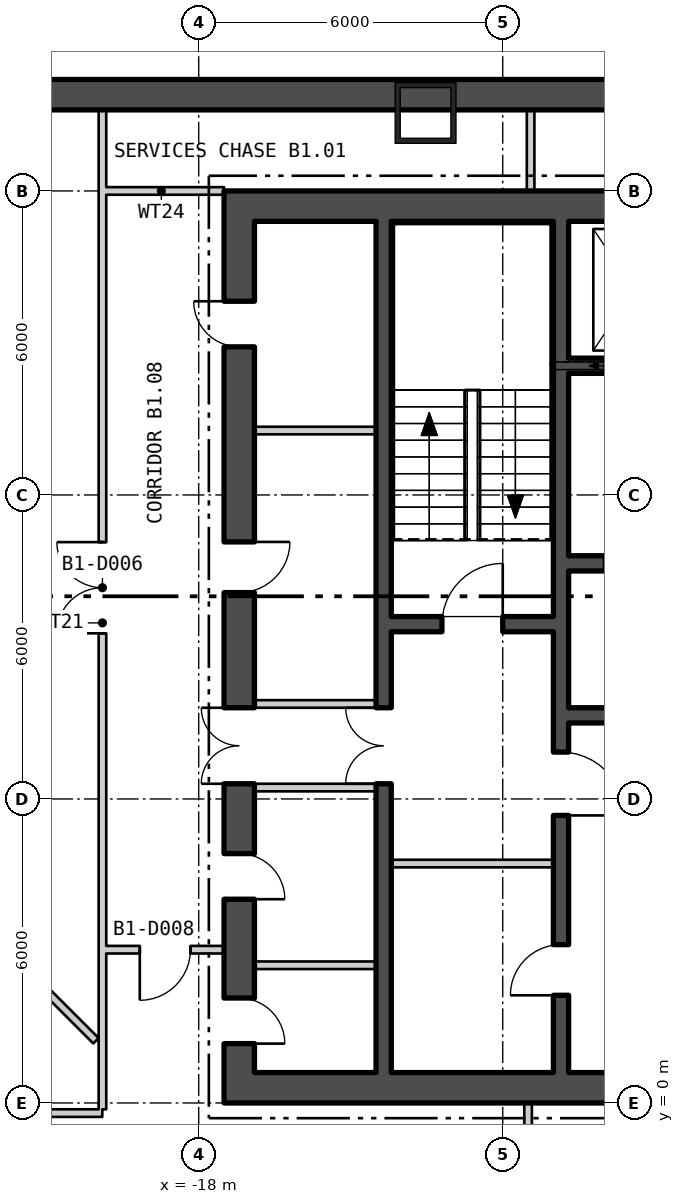
"""IFC4 building model, lengths in metres.
Left out: names, types, materials, properties, quantities, classifications, styles, units other than length and angle.
Written with IfcOpenShell. Run it as: python <this file> out.ifc"""

import sys

from ifc_helpers import new_model, si_unit, direction, frame, frame_2d, origin, origin_2d, place, context, subcontext, project, spatial, rectangle, hollow_rectangle, extrude, element, fill, save


model = new_model("IFC4")
c1 = context("Model", 3, precision=1e-05, world=origin(), true_north=direction((0.0, 1.0)))
c2 = subcontext(c1, "Body", "Model", "MODEL_VIEW")
j1 = project(units=[si_unit("LENGTHUNIT", "METRE"), si_unit("PLANEANGLEUNIT", "RADIAN")], contexts=[c1])
p1 = place(None, origin())
s1 = spatial("IfcSite", under=j1, at=p1, CompositionType="ELEMENT")
p2 = place(p1, origin())
s2 = spatial("IfcBuilding", under=s1, at=p2, CompositionType="ELEMENT")
p3 = place(p2, frame((0.0, 0.0, -5.7)))
s3 = spatial("IfcBuildingStorey", under=s2, at=p3, CompositionType="ELEMENT", Elevation=-5.7)
p4 = place(p3, frame((-13.523, 19.54, 0.0), z_axis=(0.0, 0.0, 1.0), x_axis=(-1.0, 0.0, 0.0)))
e1 = element("IfcColumn", 1, at=p4, inside=s3, PredefinedType="COLUMN", context=c2, shape_type="SweptSolid", body=[
    extrude(hollow_rectangle(XDim=1.2, YDim=1.2, WallThickness=0.1, at=origin_2d()), origin(), (0.0, 0.0, 1.0), 5.7),
])
p5 = place(p3, frame((-39.0, 19.9, -0.4), z_axis=(0.0, 0.0, 1.0), x_axis=(1.0, 0.0, 0.0)))
e2 = element("IfcWall", 2, at=p5, inside=s3, PredefinedType="STANDARD", context=c2, shape_type="SweptSolid", body=[
    extrude(rectangle(XDim=78.0, YDim=0.6, at=frame_2d((39.0, 0.0))), origin(), (0.0, 0.0, 1.0), 5.7),
])
p6 = place(p3, frame((-17.5, 0.3, 0.0), z_axis=(0.0, 0.0, 1.0), x_axis=(1.0, 0.0, 0.0)))
e3 = element("IfcWall", 3, at=p6, inside=s3, PredefinedType="SHEAR", context=c2, shape_type="SweptSolid", body=[
    extrude(rectangle(XDim=35.0, YDim=0.6, at=frame_2d((17.5, 0.0))), origin(), (0.0, 0.0, 1.0), 5.25),
])
p7 = place(p6, frame((12.0, 0.0, 0.0)))
e4 = element("IfcOpeningElement", 4, at=p7, cuts=e3, PredefinedType="OPENING", context=c2, shape_type="SweptSolid", body=[
    extrude(rectangle(XDim=1.8, YDim=2.4, at=frame_2d((0.9, 1.2))), frame((0.0, 0.31, 0.0), z_axis=(0.0, -1.0, 0.0), x_axis=(1.0, 0.0, 0.0)), (0.0, 0.0, 1.0), 0.62),
])
p8 = place(p6, frame((22.0, 0.0, 0.0)))
e5 = element("IfcOpeningElement", 5, at=p8, cuts=e3, PredefinedType="OPENING", context=c2, shape_type="SweptSolid", body=[
    extrude(rectangle(XDim=1.8, YDim=2.4, at=frame_2d((0.9, 1.2))), frame((0.0, 0.31, 0.0), z_axis=(0.0, -1.0, 0.0), x_axis=(1.0, 0.0, 0.0)), (0.0, 0.0, 1.0), 0.62),
])
p9 = place(p3, frame((-17.5, 17.7, 0.0), z_axis=(0.0, 0.0, 1.0), x_axis=(1.0, 0.0, 0.0)))
e6 = element("IfcWall", 6, at=p9, inside=s3, PredefinedType="SHEAR", context=c2, shape_type="SweptSolid", body=[
    extrude(rectangle(XDim=35.0, YDim=0.6, at=frame_2d((17.5, 0.0))), origin(), (0.0, 0.0, 1.0), 5.25),
])
p10 = place(p3, frame((-17.2, 0.6, 0.0), z_axis=(0.0, 0.0, 1.0), x_axis=(0.0, 1.0, 0.0)))
e7 = element("IfcWall", 7, at=p10, inside=s3, PredefinedType="SHEAR", context=c2, shape_type="SweptSolid", body=[
    extrude(rectangle(XDim=16.8, YDim=0.6, at=frame_2d((8.4, 0.0))), origin(), (0.0, 0.0, 1.0), 5.25),
])
p11 = place(p10, frame((5.7, 0.0, 0.0)))
e8 = element("IfcOpeningElement", 8, at=p11, cuts=e7, PredefinedType="OPENING", context=c2, shape_type="SweptSolid", body=[
    extrude(rectangle(XDim=1.5, YDim=2.1, at=frame_2d((0.75, 1.05))), frame((0.0, 0.31, 0.0), z_axis=(0.0, -1.0, 0.0), x_axis=(1.0, 0.0, 0.0)), (0.0, 0.0, 1.0), 0.62),
])
p12 = place(p10, frame((0.571, 0.0, 0.0)))
e9 = element("IfcOpeningElement", 9, at=p12, cuts=e7, PredefinedType="OPENING", context=c2, shape_type="SweptSolid", body=[
    extrude(rectangle(XDim=0.9, YDim=2.1, at=frame_2d((0.45, 1.05))), frame((0.0, 0.31, 0.0), z_axis=(0.0, -1.0, 0.0), x_axis=(1.0, 0.0, 0.0)), (0.0, 0.0, 1.0), 0.62),
])
p13 = place(p10, frame((3.421, 0.0, 0.0)))
e10 = element("IfcOpeningElement", 10, at=p13, cuts=e7, PredefinedType="OPENING", context=c2, shape_type="SweptSolid", body=[
    extrude(rectangle(XDim=0.9, YDim=2.1, at=frame_2d((0.45, 1.05))), frame((0.0, 0.31, 0.0), z_axis=(0.0, -1.0, 0.0), x_axis=(1.0, 0.0, 0.0)), (0.0, 0.0, 1.0), 0.62),
])
p14 = place(p10, frame((9.473, 0.0, 0.0)))
e11 = element("IfcOpeningElement", 11, at=p14, cuts=e7, PredefinedType="OPENING", context=c2, shape_type="SweptSolid", body=[
    extrude(rectangle(XDim=1.0, YDim=2.1, at=frame_2d((0.5, 1.05))), frame((0.0, 0.31, 0.0), z_axis=(0.0, -1.0, 0.0), x_axis=(1.0, 0.0, 0.0)), (0.0, 0.0, 1.0), 0.62),
])
p15 = place(p10, frame((14.323, 0.0, 0.0)))
e12 = element("IfcOpeningElement", 12, at=p15, cuts=e7, PredefinedType="OPENING", context=c2, shape_type="SweptSolid", body=[
    extrude(rectangle(XDim=0.9, YDim=2.1, at=frame_2d((0.45, 1.05))), frame((0.0, 0.31, 0.0), z_axis=(0.0, -1.0, 0.0), x_axis=(1.0, 0.0, 0.0)), (0.0, 0.0, 1.0), 0.62),
])
p16 = place(p3, frame((-10.85, 0.6, 0.0), z_axis=(0.0, 0.0, 1.0), x_axis=(0.0, 1.0, 0.0)))
e13 = element("IfcWall", 13, at=p16, inside=s3, PredefinedType="SHEAR", context=c2, shape_type="SweptSolid", body=[
    extrude(rectangle(XDim=16.8, YDim=0.3, at=frame_2d((8.4, 0.0))), origin(), (0.0, 0.0, 1.0), 5.25),
])
p17 = place(p16, frame((5.075, 0.0, 0.0)))
e14 = element("IfcOpeningElement", 14, at=p17, cuts=e13, PredefinedType="OPENING", context=c2, shape_type="SweptSolid", body=[
    extrude(rectangle(XDim=1.25, YDim=2.1, at=frame_2d((0.625, 1.05))), frame((0.0, 0.16, 0.0), z_axis=(0.0, -1.0, 0.0), x_axis=(1.0, 0.0, 0.0)), (0.0, 0.0, 1.0), 0.32),
])
p18 = place(p16, frame((1.525, 0.0, 0.0)))
e15 = element("IfcOpeningElement", 15, at=p18, cuts=e13, PredefinedType="OPENING", context=c2, shape_type="SweptSolid", body=[
    extrude(rectangle(XDim=1.0, YDim=2.1, at=frame_2d((0.5, 1.05))), frame((0.0, 0.16, 0.0), z_axis=(0.0, -1.0, 0.0), x_axis=(1.0, 0.0, 0.0)), (0.0, 0.0, 1.0), 0.32),
])
p19 = place(p3, frame((-14.35, 0.6, 0.0), z_axis=(0.0, 0.0, 1.0), x_axis=(0.0, 1.0, 0.0)))
e16 = element("IfcWall", 16, at=p19, inside=s3, PredefinedType="SHEAR", context=c2, shape_type="SweptSolid", body=[
    extrude(rectangle(XDim=16.8, YDim=0.3, at=frame_2d((8.4, 0.0))), origin(), (0.0, 0.0, 1.0), 5.25),
])
p20 = place(p19, frame((5.7, 0.0, 0.0)))
e17 = element("IfcOpeningElement", 17, at=p20, cuts=e16, PredefinedType="OPENING", context=c2, shape_type="SweptSolid", body=[
    extrude(rectangle(XDim=1.5, YDim=2.1, at=frame_2d((0.75, 1.05))), frame((0.0, 0.16, 0.0), z_axis=(0.0, -1.0, 0.0), x_axis=(1.0, 0.0, 0.0)), (0.0, 0.0, 1.0), 0.32),
])
p21 = place(p3, frame((-14.2, 9.45, 0.0), z_axis=(0.0, 0.0, 1.0), x_axis=(1.0, 0.0, 0.0)))
e18 = element("IfcWall", 18, at=p21, inside=s3, PredefinedType="SHEAR", context=c2, shape_type="SweptSolid", body=[
    extrude(rectangle(XDim=3.2, YDim=0.3, at=frame_2d((1.6, 0.0))), origin(), (0.0, 0.0, 1.0), 5.25),
])
p22 = place(p21, frame((1.0, 0.0, 0.0)))
e19 = element("IfcOpeningElement", 19, at=p22, cuts=e18, PredefinedType="OPENING", context=c2, shape_type="SweptSolid", body=[
    extrude(rectangle(XDim=1.2, YDim=2.1, at=frame_2d((0.6, 1.05))), frame((0.0, 0.16, 0.0), z_axis=(0.0, -1.0, 0.0), x_axis=(1.0, 0.0, 0.0)), (0.0, 0.0, 1.0), 0.32),
])
p23 = place(p3, frame((-10.7, 14.55, 0.0), z_axis=(0.0, 0.0, 1.0), x_axis=(1.0, 0.0, 0.0)))
e20 = element("IfcWall", 20, at=p23, inside=s3, PredefinedType="SHEAR", context=c2, shape_type="SweptSolid", body=[
    extrude(rectangle(XDim=21.4, YDim=0.3, at=frame_2d((10.7, 0.0))), origin(), (0.0, 0.0, 1.0), 5.25),
])
p24 = place(p23, frame((0.738, 0.0, 0.0)))
e21 = element("IfcOpeningElement", 21, at=p24, cuts=e20, PredefinedType="OPENING", context=c2, shape_type="SweptSolid", body=[
    extrude(rectangle(XDim=1.1, YDim=2.1, at=frame_2d((0.55, 1.05))), frame((0.0, 0.16, 0.0), z_axis=(0.0, -1.0, 0.0), x_axis=(1.0, 0.0, 0.0)), (0.0, 0.0, 1.0), 0.32),
])
p25 = place(p23, frame((3.462, 0.0, 0.0)))
e22 = element("IfcOpeningElement", 22, at=p25, cuts=e20, PredefinedType="OPENING", context=c2, shape_type="SweptSolid", body=[
    extrude(rectangle(XDim=1.1, YDim=2.1, at=frame_2d((0.55, 1.05))), frame((0.0, 0.16, 0.0), z_axis=(0.0, -1.0, 0.0), x_axis=(1.0, 0.0, 0.0)), (0.0, 0.0, 1.0), 0.32),
])
p26 = place(p23, frame((6.138, 0.0, 0.0)))
e23 = element("IfcOpeningElement", 23, at=p26, cuts=e20, PredefinedType="OPENING", context=c2, shape_type="SweptSolid", body=[
    extrude(rectangle(XDim=1.1, YDim=2.1, at=frame_2d((0.55, 1.05))), frame((0.0, 0.16, 0.0), z_axis=(0.0, -1.0, 0.0), x_axis=(1.0, 0.0, 0.0)), (0.0, 0.0, 1.0), 0.32),
])
p27 = place(p23, frame((14.162, 0.0, 0.0)))
e24 = element("IfcOpeningElement", 24, at=p27, cuts=e20, PredefinedType="OPENING", context=c2, shape_type="SweptSolid", body=[
    extrude(rectangle(XDim=1.1, YDim=2.1, at=frame_2d((0.55, 1.05))), frame((0.0, 0.16, 0.0), z_axis=(0.0, -1.0, 0.0), x_axis=(1.0, 0.0, 0.0)), (0.0, 0.0, 1.0), 0.32),
])
p28 = place(p23, frame((16.837, 0.0, 0.0)))
e25 = element("IfcOpeningElement", 25, at=p28, cuts=e20, PredefinedType="OPENING", context=c2, shape_type="SweptSolid", body=[
    extrude(rectangle(XDim=1.1, YDim=2.1, at=frame_2d((0.55, 1.05))), frame((0.0, 0.16, 0.0), z_axis=(0.0, -1.0, 0.0), x_axis=(1.0, 0.0, 0.0)), (0.0, 0.0, 1.0), 0.32),
])
p29 = place(p23, frame((19.562, 0.0, 0.0)))
e26 = element("IfcOpeningElement", 26, at=p29, cuts=e20, PredefinedType="OPENING", context=c2, shape_type="SweptSolid", body=[
    extrude(rectangle(XDim=1.1, YDim=2.1, at=frame_2d((0.55, 1.05))), frame((0.0, 0.16, 0.0), z_axis=(0.0, -1.0, 0.0), x_axis=(1.0, 0.0, 0.0)), (0.0, 0.0, 1.0), 0.32),
])
p30 = place(p23, frame((8.863, 0.0, 0.0)))
e27 = element("IfcOpeningElement", 27, at=p30, cuts=e20, PredefinedType="OPENING", context=c2, shape_type="SweptSolid", body=[
    extrude(rectangle(XDim=1.0, YDim=2.1, at=frame_2d((0.5, 1.05))), frame((0.0, 0.16, 0.0), z_axis=(0.0, -1.0, 0.0), x_axis=(1.0, 0.0, 0.0)), (0.0, 0.0, 1.0), 0.32),
])
p31 = place(p23, frame((11.537, 0.0, 0.0)))
e28 = element("IfcOpeningElement", 28, at=p31, cuts=e20, PredefinedType="OPENING", context=c2, shape_type="SweptSolid", body=[
    extrude(rectangle(XDim=1.0, YDim=2.1, at=frame_2d((0.5, 1.05))), frame((0.0, 0.16, 0.0), z_axis=(0.0, -1.0, 0.0), x_axis=(1.0, 0.0, 0.0)), (0.0, 0.0, 1.0), 0.32),
])
p32 = place(p3, frame((-10.7, 10.65, 0.0), z_axis=(0.0, 0.0, 1.0), x_axis=(1.0, 0.0, 0.0)))
e29 = element("IfcWall", 29, at=p32, inside=s3, PredefinedType="SHEAR", context=c2, shape_type="SweptSolid", body=[
    extrude(rectangle(XDim=10.3, YDim=0.3, at=frame_2d((5.15, 0.0))), origin(), (0.0, 0.0, 1.0), 5.25),
])
p33 = place(p32, frame((0.725, 0.0, 0.0)))
e30 = element("IfcOpeningElement", 30, at=p33, cuts=e29, PredefinedType="OPENING", context=c2, shape_type="SweptSolid", body=[
    extrude(rectangle(XDim=1.0, YDim=2.1, at=frame_2d((0.5, 1.05))), frame((0.0, 0.16, 0.0), z_axis=(0.0, -1.0, 0.0), x_axis=(1.0, 0.0, 0.0)), (0.0, 0.0, 1.0), 0.32),
])
p34 = place(p32, frame((3.325, 0.0, 0.0)))
e31 = element("IfcOpeningElement", 31, at=p34, cuts=e29, PredefinedType="OPENING", context=c2, shape_type="SweptSolid", body=[
    extrude(rectangle(XDim=1.0, YDim=2.1, at=frame_2d((0.5, 1.05))), frame((0.0, 0.16, 0.0), z_axis=(0.0, -1.0, 0.0), x_axis=(1.0, 0.0, 0.0)), (0.0, 0.0, 1.0), 0.32),
])
p35 = place(p32, frame((5.875, 0.0, 0.0)))
e32 = element("IfcOpeningElement", 32, at=p35, cuts=e29, PredefinedType="OPENING", context=c2, shape_type="SweptSolid", body=[
    extrude(rectangle(XDim=1.0, YDim=2.1, at=frame_2d((0.5, 1.05))), frame((0.0, 0.16, 0.0), z_axis=(0.0, -1.0, 0.0), x_axis=(1.0, 0.0, 0.0)), (0.0, 0.0, 1.0), 0.32),
])
p36 = place(p32, frame((8.425, 0.0, 0.0)))
e33 = element("IfcOpeningElement", 33, at=p36, cuts=e29, PredefinedType="OPENING", context=c2, shape_type="SweptSolid", body=[
    extrude(rectangle(XDim=1.0, YDim=2.1, at=frame_2d((0.5, 1.05))), frame((0.0, 0.16, 0.0), z_axis=(0.0, -1.0, 0.0), x_axis=(1.0, 0.0, 0.0)), (0.0, 0.0, 1.0), 0.32),
])
p37 = place(p3, frame((-10.7, 7.65, 0.0), z_axis=(0.0, 0.0, 1.0), x_axis=(1.0, 0.0, 0.0)))
e34 = element("IfcWall", 34, at=p37, inside=s3, PredefinedType="SHEAR", context=c2, shape_type="SweptSolid", body=[
    extrude(rectangle(XDim=10.3, YDim=0.3, at=frame_2d((5.15, 0.0))), origin(), (0.0, 0.0, 1.0), 5.25),
])
p38 = place(p3, frame((-14.2, 4.725, 0.0), z_axis=(0.0, 0.0, 1.0), x_axis=(1.0, 0.0, 0.0)))
e35 = element("IfcWall", 35, at=p38, inside=s3, PredefinedType="PARTITIONING", context=c2, shape_type="SweptSolid", body=[
    extrude(rectangle(XDim=3.2, YDim=0.15, at=frame_2d((1.6, 0.0))), origin(), (0.0, 0.0, 1.0), 5.25),
])
for number, where, z_axis, x_axis in (
    (36, (-16.9, 6.225, 0.0), (0.0, 0.0, 1.0), (1.0, 0.0, 0.0)),
    (37, (-16.9, 7.875, 0.0), (0.0, 0.0, 1.0), (1.0, 0.0, 0.0)),
    (38, (-16.9, 2.718, 0.0), (0.0, 0.0, 1.0), (1.0, 0.0, 0.0)),
    (39, (-16.9, 13.271, 0.0), (0.0, 0.0, 1.0), (1.0, 0.0, 0.0)),
):
    element("IfcWall", number, at=place(p3, frame(where, z_axis=z_axis, x_axis=x_axis)), inside=s3, PredefinedType="PARTITIONING", context=c2, shape_type="SweptSolid", body=[
        extrude(rectangle(XDim=2.4, YDim=0.15, at=frame_2d((1.2, 0.0))), origin(), (0.0, 0.0, 1.0), 5.25),
    ])
p39 = place(p3, frame((-26.75, -0.2, 0.0), z_axis=(0.0, 0.0, 1.0), x_axis=(1.0, 0.0, 0.0)))
e40 = element("IfcWall", 40, at=p39, inside=s3, PredefinedType="PARTITIONING", context=c2, shape_type="SweptSolid", body=[
    extrude(rectangle(XDim=6.847, YDim=0.15, at=frame_2d((3.424, 0.0))), origin(), (0.0, 0.0, 1.0), 5.25),
])
p40 = place(p39, frame((3.983, 0.0, 0.0)))
e41 = element("IfcOpeningElement", 41, at=p40, cuts=e40, PredefinedType="OPENING", context=c2, shape_type="SweptSolid", body=[
    extrude(rectangle(XDim=1.0, YDim=2.1, at=frame_2d((0.5, 1.05))), frame((0.0, 0.085, 0.0), z_axis=(0.0, -1.0, 0.0), x_axis=(1.0, 0.0, 0.0)), (0.0, 0.0, 1.0), 0.17),
])
p41 = place(p3, frame((-25.392, 6.592, 0.0), z_axis=(0.0, 0.0, 1.0), x_axis=(0.707106781187, -0.707106781187, 0.0)))
e42 = element("IfcWall", 42, at=p41, inside=s3, PredefinedType="PARTITIONING", context=c2, shape_type="SweptSolid", body=[
    extrude(rectangle(XDim=7.586, YDim=0.15, at=frame_2d((3.793, 0.0))), origin(), (0.0, 0.0, 1.0), 5.25),
])
p42 = place(p3, frame((-19.975, 18.0, 0.0), z_axis=(0.0, 0.0, 1.0), x_axis=(1.0, 0.0, 0.0)))
e43 = element("IfcWall", 43, at=p42, inside=s3, PredefinedType="PARTITIONING", context=c2, shape_type="SweptSolid", body=[
    extrude(rectangle(XDim=2.475, YDim=0.15, at=frame_2d((1.238, 0.0))), origin(), (0.0, 0.0, 1.0), 5.25),
])
p43 = place(p3, frame((-19.9, -0.125, 0.0), z_axis=(0.0, 0.0, 1.0), x_axis=(0.0, 1.0, 0.0)))
e44 = element("IfcWall", 44, at=p43, inside=s3, PredefinedType="PARTITIONING", context=c2, shape_type="SweptSolid", body=[
    extrude(rectangle(XDim=1.15, YDim=0.15, at=frame_2d((0.575, 0.0))), origin(), (0.0, 0.0, 1.0), 5.25),
])
p44 = place(p3, frame((-19.9, 1.025, 0.0), z_axis=(0.0, 0.0, 1.0), x_axis=(0.0, 1.0, 0.0)))
e45 = element("IfcWall", 45, at=p44, inside=s3, PredefinedType="PARTITIONING", context=c2, shape_type="SweptSolid", body=[
    extrude(rectangle(XDim=16.9, YDim=0.15, at=frame_2d((8.45, 0.0))), origin(), (0.0, 0.0, 1.0), 5.25),
])
p45 = place(p44, frame((8.244, 0.0, 0.0)))
e46 = element("IfcOpeningElement", 46, at=p45, cuts=e45, PredefinedType="OPENING", context=c2, shape_type="SweptSolid", body=[
    extrude(rectangle(XDim=1.8, YDim=2.1, at=frame_2d((0.9, 1.05))), frame((0.0, 0.085, 0.0), z_axis=(0.0, -1.0, 0.0), x_axis=(1.0, 0.0, 0.0)), (0.0, 0.0, 1.0), 0.17),
])
p46 = place(p3, frame((-19.9, 18.075, 0.0), z_axis=(0.0, 0.0, 1.0), x_axis=(0.0, 1.0, 0.0)))
e47 = element("IfcWall", 47, at=p46, inside=s3, PredefinedType="PARTITIONING", context=c2, shape_type="SweptSolid", body=[
    extrude(rectangle(XDim=1.675, YDim=0.15, at=frame_2d((0.838, 0.0))), origin(), (0.0, 0.0, 1.0), 5.25),
])
p47 = place(p3, frame((-19.825, 3.025, 0.0), z_axis=(0.0, 0.0, 1.0), x_axis=(1.0, 0.0, 0.0)))
e48 = element("IfcWall", 48, at=p47, inside=s3, PredefinedType="PARTITIONING", context=c2, shape_type="SweptSolid", body=[
    extrude(rectangle(XDim=2.325, YDim=0.15, at=frame_2d((1.163, 0.0))), origin(), (0.0, 0.0, 1.0), 5.25),
])
p48 = place(p47, frame((0.662, 0.0, 0.0)))
e49 = element("IfcOpeningElement", 49, at=p48, cuts=e48, PredefinedType="OPENING", context=c2, shape_type="SweptSolid", body=[
    extrude(rectangle(XDim=1.0, YDim=2.1, at=frame_2d((0.5, 1.05))), frame((0.0, 0.085, 0.0), z_axis=(0.0, -1.0, 0.0), x_axis=(1.0, 0.0, 0.0)), (0.0, 0.0, 1.0), 0.17),
])
p49 = place(p3, frame((-11.5, -6.075, 0.0), z_axis=(0.0, 0.0, 1.0), x_axis=(0.0, 1.0, 0.0)))
e50 = element("IfcWall", 50, at=p49, inside=s3, PredefinedType="PARTITIONING", context=c2, shape_type="SweptSolid", body=[
    extrude(rectangle(XDim=6.075, YDim=0.15, at=frame_2d((3.038, 0.0))), origin(), (0.0, 0.0, 1.0), 5.25),
])
p50 = place(p49, frame((4.375, 0.0, 0.0)))
e51 = element("IfcOpeningElement", 51, at=p50, cuts=e50, PredefinedType="OPENING", context=c2, shape_type="SweptSolid", body=[
    extrude(rectangle(XDim=1.0, YDim=2.1, at=frame_2d((0.5, 1.05))), frame((0.0, 0.085, 0.0), z_axis=(0.0, -1.0, 0.0), x_axis=(1.0, 0.0, 0.0)), (0.0, 0.0, 1.0), 0.17),
])
p51 = place(p3, frame((-11.45, 18.0, 0.0), z_axis=(0.0, 0.0, 1.0), x_axis=(0.0, 1.0, 0.0)))
e52 = element("IfcWall", 52, at=p51, inside=s3, PredefinedType="PARTITIONING", context=c2, shape_type="SweptSolid", body=[
    extrude(rectangle(XDim=1.75, YDim=0.15, at=frame_2d((0.875, 0.0))), origin(), (0.0, 0.0, 1.0), 5.25),
])
p52 = place(p22, origin())
e53 = element("IfcDoor", 53, at=p52, inside=s3, OperationType="SINGLE_SWING_LEFT", PredefinedType="DOOR", context=c2, shape_type="SweptSolid", body=[
    extrude(rectangle(XDim=1.2, YDim=2.1, at=frame_2d((0.6, 1.05))), frame((0.0, 0.025, 0.0), z_axis=(0.0, -1.0, 0.0), x_axis=(1.0, 0.0, 0.0)), (0.0, 0.0, 1.0), 0.05),
])
fill(e19, e53)
p53 = place(p17, origin())
e54 = element("IfcDoor", 54, at=p53, inside=s3, OperationType="SINGLE_SWING_LEFT", PredefinedType="DOOR", context=c2, shape_type="SweptSolid", body=[
    extrude(rectangle(XDim=1.25, YDim=2.1, at=frame_2d((0.625, 1.05))), frame((0.0, 0.025, 0.0), z_axis=(0.0, -1.0, 0.0), x_axis=(1.0, 0.0, 0.0)), (0.0, 0.0, 1.0), 0.05),
])
fill(e14, e54)
p54 = place(p18, origin())
e55 = element("IfcDoor", 55, at=p54, inside=s3, OperationType="SINGLE_SWING_RIGHT", PredefinedType="DOOR", context=c2, shape_type="SweptSolid", body=[
    extrude(rectangle(XDim=1.0, YDim=2.1, at=frame_2d((0.5, 1.05))), frame((0.0, 0.025, 0.0), z_axis=(0.0, -1.0, 0.0), x_axis=(1.0, 0.0, 0.0)), (0.0, 0.0, 1.0), 0.05),
])
fill(e15, e55)
p55 = place(p20, origin())
e56 = element("IfcDoor", 56, at=p55, inside=s3, OperationType="DOUBLE_DOOR_SINGLE_SWING", PredefinedType="DOOR", context=c2, shape_type="SweptSolid", body=[
    extrude(rectangle(XDim=1.5, YDim=2.1, at=frame_2d((0.75, 1.05))), frame((0.0, 0.025, 0.0), z_axis=(0.0, -1.0, 0.0), x_axis=(1.0, 0.0, 0.0)), (0.0, 0.0, 1.0), 0.05),
])
fill(e17, e56)
p56 = place(p11, origin())
e57 = element("IfcDoor", 57, at=p56, inside=s3, OperationType="DOUBLE_DOOR_SINGLE_SWING", PredefinedType="DOOR", context=c2, shape_type="SweptSolid", body=[
    extrude(rectangle(XDim=1.5, YDim=2.1, at=frame_2d((0.75, 1.05))), frame((0.0, 0.025, 0.0), z_axis=(0.0, -1.0, 0.0), x_axis=(1.0, 0.0, 0.0)), (0.0, 0.0, 1.0), 0.05),
])
fill(e8, e57)
p57 = place(p12, origin())
e58 = element("IfcDoor", 58, at=p57, inside=s3, OperationType="SINGLE_SWING_LEFT", PredefinedType="DOOR", context=c2, shape_type="SweptSolid", body=[
    extrude(rectangle(XDim=0.9, YDim=2.1, at=frame_2d((0.45, 1.05))), frame((0.0, 0.025, 0.0), z_axis=(0.0, -1.0, 0.0), x_axis=(1.0, 0.0, 0.0)), (0.0, 0.0, 1.0), 0.05),
])
fill(e9, e58)
p58 = place(p13, origin())
e59 = element("IfcDoor", 59, at=p58, inside=s3, OperationType="SINGLE_SWING_LEFT", PredefinedType="DOOR", context=c2, shape_type="SweptSolid", body=[
    extrude(rectangle(XDim=0.9, YDim=2.1, at=frame_2d((0.45, 1.05))), frame((0.0, 0.025, 0.0), z_axis=(0.0, -1.0, 0.0), x_axis=(1.0, 0.0, 0.0)), (0.0, 0.0, 1.0), 0.05),
])
fill(e10, e59)
p59 = place(p14, origin())
e60 = element("IfcDoor", 60, at=p59, inside=s3, OperationType="SINGLE_SWING_RIGHT", PredefinedType="DOOR", context=c2, shape_type="SweptSolid", body=[
    extrude(rectangle(XDim=1.0, YDim=2.1, at=frame_2d((0.5, 1.05))), frame((0.0, 0.025, 0.0), z_axis=(0.0, -1.0, 0.0), x_axis=(1.0, 0.0, 0.0)), (0.0, 0.0, 1.0), 0.05),
])
fill(e11, e60)
p60 = place(p15, origin())
e61 = element("IfcDoor", 61, at=p60, inside=s3, OperationType="SINGLE_SWING_LEFT", PredefinedType="DOOR", context=c2, shape_type="SweptSolid", body=[
    extrude(rectangle(XDim=0.9, YDim=2.1, at=frame_2d((0.45, 1.05))), frame((0.0, 0.025, 0.0), z_axis=(0.0, -1.0, 0.0), x_axis=(1.0, 0.0, 0.0)), (0.0, 0.0, 1.0), 0.05),
])
fill(e12, e61)
p61 = place(p45, origin())
e62 = element("IfcDoor", 62, at=p61, inside=s3, OperationType="DOUBLE_DOOR_SINGLE_SWING", PredefinedType="DOOR", context=c2, shape_type="SweptSolid", body=[
    extrude(rectangle(XDim=1.8, YDim=2.1, at=frame_2d((0.9, 1.05))), frame((0.0, 0.025, 0.0), z_axis=(0.0, -1.0, 0.0), x_axis=(1.0, 0.0, 0.0)), (0.0, 0.0, 1.0), 0.05),
])
fill(e46, e62)
p62 = place(p48, origin())
e63 = element("IfcDoor", 63, at=p62, inside=s3, OperationType="SINGLE_SWING_LEFT", PredefinedType="DOOR", context=c2, shape_type="SweptSolid", body=[
    extrude(rectangle(XDim=1.0, YDim=2.1, at=frame_2d((0.5, 1.05))), frame((0.0, 0.025, 0.0), z_axis=(0.0, -1.0, 0.0), x_axis=(1.0, 0.0, 0.0)), (0.0, 0.0, 1.0), 0.05),
])
fill(e49, e63)
save(model, sys.argv[1])
